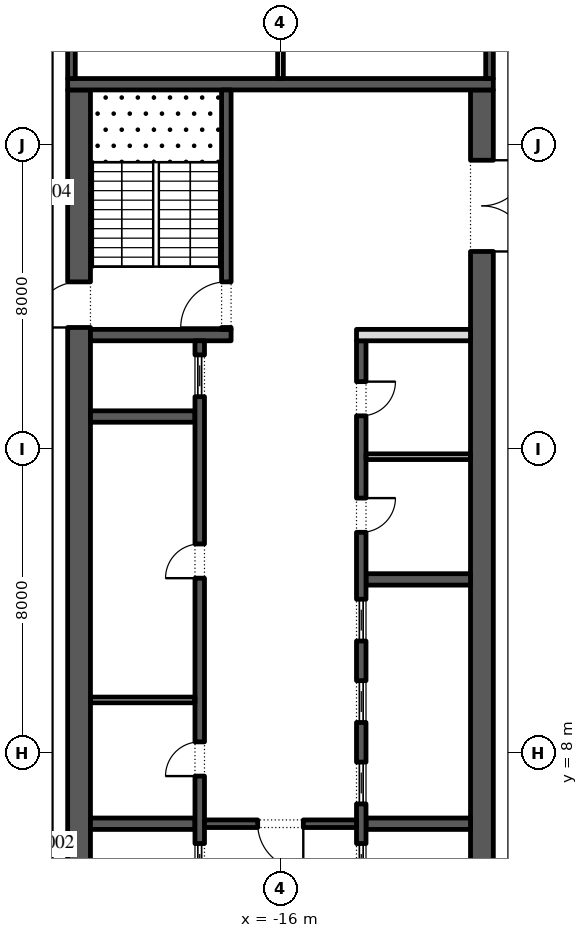
"""IFC4 building model, lengths in metres.
Left out: names, types, materials, properties, quantities, classifications, styles, units other than length and angle.
Written with IfcOpenShell. Run it as: python <this file> out.ifc"""

import sys

from ifc_helpers import new_model, si_unit, direction, frame, frame_2d, origin, place, context, subcontext, project, spatial, rectangle, extrude, element, fill, save


model = new_model("IFC4")
c1 = context("Model", 3, precision=1e-05, world=origin(), true_north=direction((0.0, 1.0)))
c2 = subcontext(c1, "Body", "Model", "MODEL_VIEW")
j1 = project(units=[si_unit("LENGTHUNIT", "METRE"), si_unit("PLANEANGLEUNIT", "RADIAN")], contexts=[c1])
p1 = place(None, origin())
s1 = spatial("IfcSite", under=j1, at=p1, CompositionType="ELEMENT")
p2 = place(p1, origin())
s2 = spatial("IfcBuilding", under=s1, at=p2, CompositionType="ELEMENT")
p3 = place(p2, frame((0.0, 0.0, 243.0)))
s3 = spatial("IfcBuildingStorey", under=s2, at=p3, CompositionType="ELEMENT", Elevation=243.0)
p4 = place(p3, frame((-21.359, 48.678, 0.0), z_axis=(0.0, 0.0, 1.0), x_axis=(-0.224949198343, -0.974370493275, 0.0)))
e1 = element("IfcWall", 1, at=p4, inside=s3, PredefinedType="STANDARD", context=c2, shape_type="SweptSolid", body=[
    extrude(rectangle(XDim=49.5, YDim=0.3, at=frame_2d((24.75, 0.0))), origin(), (0.0, 0.0, 1.0), 4.0),
])
p5 = place(p4, frame((1.157, 0.0, 0.45)))
e2 = element("IfcOpeningElement", 2, at=p5, cuts=e1, PredefinedType="OPENING", context=c2, shape_type="SweptSolid", body=[
    extrude(rectangle(XDim=4.5, YDim=3.05, at=frame_2d((2.25, 1.525))), frame((0.0, 0.16, 0.0), z_axis=(0.0, -1.0, 0.0), x_axis=(1.0, 0.0, 0.0)), (0.0, 0.0, 1.0), 0.32),
])
p6 = place(p4, frame((9.171, 0.0, 0.0)))
e3 = element("IfcOpeningElement", 3, at=p6, cuts=e1, PredefinedType="OPENING", context=c2, shape_type="SweptSolid", body=[
    extrude(rectangle(XDim=2.4, YDim=3.5, at=frame_2d((1.2, 1.75))), frame((0.0, 0.16, 0.0), z_axis=(0.0, -1.0, 0.0), x_axis=(1.0, 0.0, 0.0)), (0.0, 0.0, 1.0), 0.32),
])
p7 = place(p4, frame((15.236, 0.0, 0.45)))
e4 = element("IfcOpeningElement", 4, at=p7, cuts=e1, PredefinedType="OPENING", context=c2, shape_type="SweptSolid", body=[
    extrude(rectangle(XDim=4.5, YDim=3.05, at=frame_2d((2.25, 1.525))), frame((0.0, 0.16, 0.0), z_axis=(0.0, -1.0, 0.0), x_axis=(1.0, 0.0, 0.0)), (0.0, 0.0, 1.0), 0.32),
])
p8 = place(p4, frame((22.35, 0.0, 0.45)))
e5 = element("IfcOpeningElement", 5, at=p8, cuts=e1, PredefinedType="OPENING", context=c2, shape_type="SweptSolid", body=[
    extrude(rectangle(XDim=4.5, YDim=3.05, at=frame_2d((2.25, 1.525))), frame((0.0, 0.16, 0.0), z_axis=(0.0, -1.0, 0.0), x_axis=(1.0, 0.0, 0.0)), (0.0, 0.0, 1.0), 0.32),
])
p9 = place(p4, frame((29.464, 0.0, 0.45)))
e6 = element("IfcOpeningElement", 6, at=p9, cuts=e1, PredefinedType="OPENING", context=c2, shape_type="SweptSolid", body=[
    extrude(rectangle(XDim=4.5, YDim=3.05, at=frame_2d((2.25, 1.525))), frame((0.0, 0.16, 0.0), z_axis=(0.0, -1.0, 0.0), x_axis=(1.0, 0.0, 0.0)), (0.0, 0.0, 1.0), 0.32),
])
p10 = place(p4, frame((37.628, 0.0, 0.0)))
e7 = element("IfcOpeningElement", 7, at=p10, cuts=e1, PredefinedType="OPENING", context=c2, shape_type="SweptSolid", body=[
    extrude(rectangle(XDim=2.4, YDim=3.325, at=frame_2d((1.2, 1.663))), frame((0.0, 0.16, 0.0), z_axis=(0.0, -1.0, 0.0), x_axis=(1.0, 0.0, 0.0)), (0.0, 0.0, 1.0), 0.32),
])
p11 = place(p4, frame((43.693, 0.0, 0.45)))
e8 = element("IfcOpeningElement", 8, at=p11, cuts=e1, PredefinedType="OPENING", context=c2, shape_type="SweptSolid", body=[
    extrude(rectangle(XDim=4.5, YDim=2.825, at=frame_2d((2.25, 1.413))), frame((0.0, 0.16, 0.0), z_axis=(0.0, -1.0, 0.0), x_axis=(1.0, 0.0, 0.0)), (0.0, 0.0, 1.0), 0.32),
])
p12 = place(p3, frame((-21.3, -2.45, 0.0), z_axis=(0.0, 0.0, 1.0), x_axis=(0.0, 1.0, 0.0)))
e9 = element("IfcWall", 9, at=p12, inside=s3, PredefinedType="SHEAR", context=c2, shape_type="SweptSolid", body=[
    extrude(rectangle(XDim=27.9, YDim=0.6, at=frame_2d((13.95, 0.0))), origin(), (0.0, 0.0, 1.0), 4.0),
])
p13 = place(p12, frame((5.05, 0.0, 0.0)))
e10 = element("IfcOpeningElement", 10, at=p13, cuts=e9, PredefinedType="OPENING", context=c2, shape_type="SweptSolid", body=[
    extrude(rectangle(XDim=1.2, YDim=2.1, at=frame_2d((0.6, 1.05))), frame((0.0, 0.31, 0.0), z_axis=(0.0, -1.0, 0.0), x_axis=(1.0, 0.0, 0.0)), (0.0, 0.0, 1.0), 0.62),
])
p14 = place(p12, frame((21.65, 0.0, 0.0)))
e11 = element("IfcOpeningElement", 11, at=p14, cuts=e9, PredefinedType="OPENING", context=c2, shape_type="SweptSolid", body=[
    extrude(rectangle(XDim=1.2, YDim=2.1, at=frame_2d((0.6, 1.05))), frame((0.0, 0.31, 0.0), z_axis=(0.0, -1.0, 0.0), x_axis=(1.0, 0.0, 0.0)), (0.0, 0.0, 1.0), 0.62),
])
p15 = place(p3, frame((-10.7, -2.45, 0.0), z_axis=(0.0, 0.0, 1.0), x_axis=(0.0, 1.0, 0.0)))
e12 = element("IfcWall", 12, at=p15, inside=s3, PredefinedType="SHEAR", context=c2, shape_type="SweptSolid", body=[
    extrude(rectangle(XDim=27.9, YDim=0.6, at=frame_2d((13.95, 0.0))), origin(), (0.0, 0.0, 1.0), 4.0),
])
p16 = place(p15, frame((23.65, 0.0, 0.0)))
e13 = element("IfcOpeningElement", 13, at=p16, cuts=e12, PredefinedType="OPENING", context=c2, shape_type="SweptSolid", body=[
    extrude(rectangle(XDim=2.4, YDim=2.1, at=frame_2d((1.2, 1.05))), frame((0.0, 0.31, 0.0), z_axis=(0.0, -1.0, 0.0), x_axis=(1.0, 0.0, 0.0)), (0.0, 0.0, 1.0), 0.62),
])
p17 = place(p15, frame((1.087, 0.0, 0.0)))
e14 = element("IfcOpeningElement", 14, at=p17, cuts=e12, PredefinedType="OPENING", context=c2, shape_type="SweptSolid", body=[
    extrude(rectangle(XDim=0.9, YDim=2.1, at=frame_2d((0.45, 1.05))), frame((0.0, 0.31, 0.0), z_axis=(0.0, -1.0, 0.0), x_axis=(1.0, 0.0, 0.0)), (0.0, 0.0, 1.0), 0.62),
])
p18 = place(p15, frame((4.262, 0.0, 0.0)))
e15 = element("IfcOpeningElement", 15, at=p18, cuts=e12, PredefinedType="OPENING", context=c2, shape_type="SweptSolid", body=[
    extrude(rectangle(XDim=1.0, YDim=2.1, at=frame_2d((0.5, 1.05))), frame((0.0, 0.31, 0.0), z_axis=(0.0, -1.0, 0.0), x_axis=(1.0, 0.0, 0.0)), (0.0, 0.0, 1.0), 0.62),
])
p19 = place(p3, frame((-21.6, 25.6, 0.0), z_axis=(0.0, 0.0, 1.0), x_axis=(1.0, 0.0, 0.0)))
e16 = element("IfcWall", 16, at=p19, inside=s3, PredefinedType="SHEAR", context=c2, shape_type="SweptSolid", body=[
    extrude(rectangle(XDim=11.2, YDim=0.3, at=frame_2d((5.6, 0.0))), origin(), (0.0, 0.0, 1.0), 4.0),
])
p20 = place(p3, frame((-21.0, 19.0, 0.0), z_axis=(0.0, 0.0, 1.0), x_axis=(1.0, 0.0, 0.0)))
e17 = element("IfcWall", 17, at=p20, inside=s3, PredefinedType="SHEAR", context=c2, shape_type="SweptSolid", body=[
    extrude(rectangle(XDim=3.7, YDim=0.3, at=frame_2d((1.85, 0.0))), origin(), (0.0, 0.0, 1.0), 4.0),
])
p21 = place(p3, frame((-17.425, 19.15, 0.0), z_axis=(0.0, 0.0, 1.0), x_axis=(0.0, 1.0, 0.0)))
e18 = element("IfcWall", 18, at=p21, inside=s3, PredefinedType="SHEAR", context=c2, shape_type="SweptSolid", body=[
    extrude(rectangle(XDim=6.3, YDim=0.25, at=frame_2d((3.15, 0.0))), origin(), (0.0, 0.0, 1.0), 4.0),
])
p22 = place(p21, frame((0.05, 0.0, 0.0)))
e19 = element("IfcOpeningElement", 19, at=p22, cuts=e18, PredefinedType="OPENING", context=c2, shape_type="SweptSolid", body=[
    extrude(rectangle(XDim=1.2, YDim=2.1, at=frame_2d((0.6, 1.05))), frame((0.0, 0.135, 0.0), z_axis=(0.0, -1.0, 0.0), x_axis=(1.0, 0.0, 0.0)), (0.0, 0.0, 1.0), 0.27),
])
for number, where, z_axis, x_axis in (
    (20, (-21.0, 6.143, 0.0), (0.0, 0.0, 1.0), (1.0, 0.0, 0.0)),
    (21, (-21.0, 16.857, 0.0), (0.0, 0.0, 1.0), (1.0, 0.0, 0.0)),
):
    element("IfcWall", number, at=place(p3, frame(where, z_axis=z_axis, x_axis=x_axis)), inside=s3, PredefinedType="SHEAR", context=c2, shape_type="SweptSolid", body=[
        extrude(rectangle(XDim=2.75, YDim=0.3, at=frame_2d((1.375, 0.0))), origin(), (0.0, 0.0, 1.0), 4.0),
    ])
p23 = place(p3, frame((-18.125, 4.15, 0.0), z_axis=(0.0, 0.0, 1.0), x_axis=(0.0, 1.0, 0.0)))
e22 = element("IfcWall", 22, at=p23, inside=s3, PredefinedType="SHEAR", context=c2, shape_type="SweptSolid", body=[
    extrude(rectangle(XDim=14.7, YDim=0.25, at=frame_2d((7.35, 0.0))), origin(), (0.0, 0.0, 1.0), 4.0),
])
p24 = place(p23, frame((3.246, 0.0, 0.0)))
e23 = element("IfcOpeningElement", 23, at=p24, cuts=e22, PredefinedType="OPENING", context=c2, shape_type="SweptSolid", body=[
    extrude(rectangle(XDim=0.9, YDim=2.1, at=frame_2d((0.45, 1.05))), frame((0.0, 0.135, 0.0), z_axis=(0.0, -1.0, 0.0), x_axis=(1.0, 0.0, 0.0)), (0.0, 0.0, 1.0), 0.27),
])
p25 = place(p23, frame((8.454, 0.0, 0.0)))
e24 = element("IfcOpeningElement", 24, at=p25, cuts=e22, PredefinedType="OPENING", context=c2, shape_type="SweptSolid", body=[
    extrude(rectangle(XDim=0.9, YDim=2.1, at=frame_2d((0.45, 1.05))), frame((0.0, 0.135, 0.0), z_axis=(0.0, -1.0, 0.0), x_axis=(1.0, 0.0, 0.0)), (0.0, 0.0, 1.0), 0.27),
])
p26 = place(p23, frame((0.371, 0.0, 0.0)))
e25 = element("IfcOpeningElement", 25, at=p26, cuts=e22, PredefinedType="OPENING", context=c2, shape_type="SweptSolid", body=[
    extrude(rectangle(XDim=1.1, YDim=2.1, at=frame_2d((0.55, 1.05))), frame((0.0, 0.135, 0.0), z_axis=(0.0, -1.0, 0.0), x_axis=(1.0, 0.0, 0.0)), (0.0, 0.0, 1.0), 0.27),
])
p27 = place(p23, frame((13.229, 0.0, 0.0)))
e26 = element("IfcOpeningElement", 26, at=p27, cuts=e22, PredefinedType="OPENING", context=c2, shape_type="SweptSolid", body=[
    extrude(rectangle(XDim=1.1, YDim=2.1, at=frame_2d((0.55, 1.05))), frame((0.0, 0.135, 0.0), z_axis=(0.0, -1.0, 0.0), x_axis=(1.0, 0.0, 0.0)), (0.0, 0.0, 1.0), 0.27),
])
p28 = place(p3, frame((-21.0, 9.4, 0.0), z_axis=(0.0, 0.0, 1.0), x_axis=(1.0, 0.0, 0.0)))
e27 = element("IfcWall", 27, at=p28, inside=s3, PredefinedType="PARTITIONING", context=c2, shape_type="SweptSolid", body=[
    extrude(rectangle(XDim=2.75, YDim=0.15, at=frame_2d((1.375, 0.0))), origin(), (0.0, 0.0, 1.0), 4.0),
])
for number, where, z_axis, x_axis in (
    (28, (-13.75, 6.143, 0.0), (0.0, 0.0, 1.0), (1.0, 0.0, 0.0)),
    (29, (-13.75, 12.571, 0.0), (0.0, 0.0, 1.0), (1.0, 0.0, 0.0)),
):
    element("IfcWall", number, at=place(p3, frame(where, z_axis=z_axis, x_axis=x_axis)), inside=s3, PredefinedType="SHEAR", context=c2, shape_type="SweptSolid", body=[
        extrude(rectangle(XDim=2.75, YDim=0.3, at=frame_2d((1.375, 0.0))), origin(), (0.0, 0.0, 1.0), 4.0),
    ])
p29 = place(p3, frame((-13.875, -2.45, 0.0), z_axis=(0.0, 0.0, 1.0), x_axis=(0.0, 1.0, 0.0)))
e30 = element("IfcWall", 30, at=p29, inside=s3, PredefinedType="SHEAR", context=c2, shape_type="SweptSolid", body=[
    extrude(rectangle(XDim=21.3, YDim=0.25, at=frame_2d((10.65, 0.0))), origin(), (0.0, 0.0, 1.0), 4.0),
])
p30 = place(p29, frame((16.261, 0.0, 0.0)))
e31 = element("IfcOpeningElement", 31, at=p30, cuts=e30, PredefinedType="OPENING", context=c2, shape_type="SweptSolid", body=[
    extrude(rectangle(XDim=0.9, YDim=2.1, at=frame_2d((0.45, 1.05))), frame((0.0, 0.135, 0.0), z_axis=(0.0, -1.0, 0.0), x_axis=(1.0, 0.0, 0.0)), (0.0, 0.0, 1.0), 0.27),
])
p31 = place(p29, frame((19.325, 0.0, 0.0)))
e32 = element("IfcOpeningElement", 32, at=p31, cuts=e30, PredefinedType="OPENING", context=c2, shape_type="SweptSolid", body=[
    extrude(rectangle(XDim=0.9, YDim=2.1, at=frame_2d((0.45, 1.05))), frame((0.0, 0.135, 0.0), z_axis=(0.0, -1.0, 0.0), x_axis=(1.0, 0.0, 0.0)), (0.0, 0.0, 1.0), 0.27),
])
p32 = place(p29, frame((6.971, 0.0, 0.0)))
e33 = element("IfcOpeningElement", 33, at=p32, cuts=e30, PredefinedType="OPENING", context=c2, shape_type="SweptSolid", body=[
    extrude(rectangle(XDim=1.1, YDim=2.1, at=frame_2d((0.55, 1.05))), frame((0.0, 0.135, 0.0), z_axis=(0.0, -1.0, 0.0), x_axis=(1.0, 0.0, 0.0)), (0.0, 0.0, 1.0), 0.27),
])
p33 = place(p29, frame((9.114, 0.0, 0.0)))
e34 = element("IfcOpeningElement", 34, at=p33, cuts=e30, PredefinedType="OPENING", context=c2, shape_type="SweptSolid", body=[
    extrude(rectangle(XDim=1.1, YDim=2.1, at=frame_2d((0.55, 1.05))), frame((0.0, 0.135, 0.0), z_axis=(0.0, -1.0, 0.0), x_axis=(1.0, 0.0, 0.0)), (0.0, 0.0, 1.0), 0.27),
])
p34 = place(p29, frame((11.257, 0.0, 0.0)))
e35 = element("IfcOpeningElement", 35, at=p34, cuts=e30, PredefinedType="OPENING", context=c2, shape_type="SweptSolid", body=[
    extrude(rectangle(XDim=1.1, YDim=2.1, at=frame_2d((0.55, 1.05))), frame((0.0, 0.135, 0.0), z_axis=(0.0, -1.0, 0.0), x_axis=(1.0, 0.0, 0.0)), (0.0, 0.0, 1.0), 0.27),
])
p35 = place(p29, frame((13.4, 0.0, 0.0)))
e36 = element("IfcOpeningElement", 36, at=p35, cuts=e30, PredefinedType="OPENING", context=c2, shape_type="SweptSolid", body=[
    extrude(rectangle(XDim=1.1, YDim=2.1, at=frame_2d((0.55, 1.05))), frame((0.0, 0.135, 0.0), z_axis=(0.0, -1.0, 0.0), x_axis=(1.0, 0.0, 0.0)), (0.0, 0.0, 1.0), 0.27),
])
p36 = place(p3, frame((-14.0, 19.0, 0.0), z_axis=(0.0, 0.0, 1.0), x_axis=(1.0, 0.0, 0.0)))
e37 = element("IfcWall", 37, at=p36, inside=s3, PredefinedType="PARTITIONING", context=c2, shape_type="SweptSolid", body=[
    extrude(rectangle(XDim=3.0, YDim=0.3, at=frame_2d((1.5, 0.0))), origin(), (0.0, 0.0, 1.0), 4.0),
])
p37 = place(p3, frame((-13.75, 15.8, 0.0), z_axis=(0.0, 0.0, 1.0), x_axis=(1.0, 0.0, 0.0)))
e38 = element("IfcWall", 38, at=p37, inside=s3, PredefinedType="PARTITIONING", context=c2, shape_type="SweptSolid", body=[
    extrude(rectangle(XDim=2.75, YDim=0.15, at=frame_2d((1.375, 0.0))), origin(), (0.0, 0.0, 1.0), 4.0),
])
p38 = place(p3, frame((-18.0, 6.143, 0.0), z_axis=(0.0, 0.0, 1.0), x_axis=(1.0, 0.0, 0.0)))
e39 = element("IfcWall", 39, at=p38, inside=s3, PredefinedType="SHEAR", context=c2, shape_type="SweptSolid", body=[
    extrude(rectangle(XDim=4.0, YDim=0.2, at=frame_2d((2.0, 0.0))), origin(), (0.0, 0.0, 1.0), 4.0),
])
p39 = place(p38, frame((1.4, 0.0, 0.0)))
e40 = element("IfcOpeningElement", 40, at=p39, cuts=e39, PredefinedType="OPENING", context=c2, shape_type="SweptSolid", body=[
    extrude(rectangle(XDim=1.2, YDim=2.1, at=frame_2d((0.6, 1.05))), frame((0.0, 0.11, 0.0), z_axis=(0.0, -1.0, 0.0), x_axis=(1.0, 0.0, 0.0)), (0.0, 0.0, 1.0), 0.22),
])
p40 = place(p3, frame((-21.5, 25.75, 0.0), z_axis=(0.0, 0.0, 1.0), x_axis=(0.0, 1.0, 0.0)))
e41 = element("IfcWall", 41, at=p40, inside=s3, PredefinedType="SHEAR", context=c2, shape_type="SweptSolid", body=[
    extrude(rectangle(XDim=4.75, YDim=0.2, at=frame_2d((2.375, 0.0))), origin(), (0.0, 0.0, 1.0), 4.0),
])
p41 = place(p40, frame((1.925, 0.0, 0.0)))
e42 = element("IfcOpeningElement", 42, at=p41, cuts=e41, PredefinedType="OPENING", context=c2, shape_type="SweptSolid", body=[
    extrude(rectangle(XDim=0.9, YDim=2.1, at=frame_2d((0.45, 1.05))), frame((0.0, 0.11, 0.0), z_axis=(0.0, -1.0, 0.0), x_axis=(1.0, 0.0, 0.0)), (0.0, 0.0, 1.0), 0.22),
])
p42 = place(p3, frame((-10.5, 25.75, 0.0), z_axis=(0.0, 0.0, 1.0), x_axis=(0.0, 1.0, 0.0)))
e43 = element("IfcWall", 43, at=p42, inside=s3, PredefinedType="SHEAR", context=c2, shape_type="SweptSolid", body=[
    extrude(rectangle(XDim=4.75, YDim=0.2, at=frame_2d((2.375, 0.0))), origin(), (0.0, 0.0, 1.0), 4.0),
])
p43 = place(p42, frame((1.925, 0.0, 0.0)))
e44 = element("IfcOpeningElement", 44, at=p43, cuts=e43, PredefinedType="OPENING", context=c2, shape_type="SweptSolid", body=[
    extrude(rectangle(XDim=0.9, YDim=2.1, at=frame_2d((0.45, 1.05))), frame((0.0, 0.11, 0.0), z_axis=(0.0, -1.0, 0.0), x_axis=(1.0, 0.0, 0.0)), (0.0, 0.0, 1.0), 0.22),
])
p44 = place(p3, frame((-16.0, 25.75, 0.0), z_axis=(0.0, 0.0, 1.0), x_axis=(0.0, 1.0, 0.0)))
e45 = element("IfcWall", 45, at=p44, inside=s3, PredefinedType="PARTITIONING", context=c2, shape_type="SweptSolid", body=[
    extrude(rectangle(XDim=4.75, YDim=0.15, at=frame_2d((2.375, 0.0))), origin(), (0.0, 0.0, 1.0), 4.0),
])
p45 = place(p24, origin())
e46 = element("IfcDoor", 46, at=p45, inside=s3, OperationType="SINGLE_SWING_RIGHT", PredefinedType="DOOR", context=c2, shape_type="SweptSolid", body=[
    extrude(rectangle(XDim=0.9, YDim=2.1, at=frame_2d((0.45, 1.05))), frame((0.0, 0.125, 0.0), z_axis=(0.0, -1.0, 0.0), x_axis=(1.0, 0.0, 0.0)), (0.0, 0.0, 1.0), 0.05),
])
fill(e23, e46)
p46 = place(p25, origin())
e47 = element("IfcDoor", 47, at=p46, inside=s3, OperationType="SINGLE_SWING_RIGHT", PredefinedType="DOOR", context=c2, shape_type="SweptSolid", body=[
    extrude(rectangle(XDim=0.9, YDim=2.1, at=frame_2d((0.45, 1.05))), frame((0.0, 0.125, 0.0), z_axis=(0.0, -1.0, 0.0), x_axis=(1.0, 0.0, 0.0)), (0.0, 0.0, 1.0), 0.05),
])
fill(e24, e47)
p47 = place(p26, origin())
e48 = element("IfcDoor", 48, at=p47, inside=s3, OperationType="SLIDING_TO_LEFT", PredefinedType="DOOR", context=c2, shape_type="SweptSolid", body=[
    extrude(rectangle(XDim=1.1, YDim=2.1, at=frame_2d((0.55, 1.05))), frame((0.0, 0.025, 0.0), z_axis=(0.0, -1.0, 0.0), x_axis=(1.0, 0.0, 0.0)), (0.0, 0.0, 1.0), 0.05),
])
fill(e25, e48)
p48 = place(p27, origin())
e49 = element("IfcDoor", 49, at=p48, inside=s3, OperationType="SLIDING_TO_LEFT", PredefinedType="DOOR", context=c2, shape_type="SweptSolid", body=[
    extrude(rectangle(XDim=1.1, YDim=2.1, at=frame_2d((0.55, 1.05))), frame((0.0, 0.025, 0.0), z_axis=(0.0, -1.0, 0.0), x_axis=(1.0, 0.0, 0.0)), (0.0, 0.0, 1.0), 0.05),
])
fill(e26, e49)
p49 = place(p30, frame((0.9, -0.2, 0.0), z_axis=(0.0, 0.0, 1.0), x_axis=(-1.0, 0.0, 0.0)))
e50 = element("IfcDoor", 50, at=p49, inside=s3, OperationType="SINGLE_SWING_RIGHT", PredefinedType="DOOR", context=c2, shape_type="SweptSolid", body=[
    extrude(rectangle(XDim=0.9, YDim=2.1, at=frame_2d((0.45, 1.05))), frame((0.0, -0.075, 0.0), z_axis=(0.0, -1.0, 0.0), x_axis=(1.0, 0.0, 0.0)), (0.0, 0.0, 1.0), 0.05),
])
fill(e31, e50)
p50 = place(p31, frame((0.9, -0.2, 0.0), z_axis=(0.0, 0.0, 1.0), x_axis=(-1.0, 0.0, 0.0)))
e51 = element("IfcDoor", 51, at=p50, inside=s3, OperationType="SINGLE_SWING_RIGHT", PredefinedType="DOOR", context=c2, shape_type="SweptSolid", body=[
    extrude(rectangle(XDim=0.9, YDim=2.1, at=frame_2d((0.45, 1.05))), frame((0.0, -0.075, 0.0), z_axis=(0.0, -1.0, 0.0), x_axis=(1.0, 0.0, 0.0)), (0.0, 0.0, 1.0), 0.05),
])
fill(e32, e51)
p51 = place(p32, origin())
e52 = element("IfcDoor", 52, at=p51, inside=s3, OperationType="SLIDING_TO_LEFT", PredefinedType="DOOR", context=c2, shape_type="SweptSolid", body=[
    extrude(rectangle(XDim=1.1, YDim=2.1, at=frame_2d((0.55, 1.05))), frame((0.0, 0.025, 0.0), z_axis=(0.0, -1.0, 0.0), x_axis=(1.0, 0.0, 0.0)), (0.0, 0.0, 1.0), 0.05),
])
fill(e33, e52)
p52 = place(p33, origin())
e53 = element("IfcDoor", 53, at=p52, inside=s3, OperationType="SLIDING_TO_LEFT", PredefinedType="DOOR", context=c2, shape_type="SweptSolid", body=[
    extrude(rectangle(XDim=1.1, YDim=2.1, at=frame_2d((0.55, 1.05))), frame((0.0, 0.025, 0.0), z_axis=(0.0, -1.0, 0.0), x_axis=(1.0, 0.0, 0.0)), (0.0, 0.0, 1.0), 0.05),
])
fill(e34, e53)
p53 = place(p34, origin())
e54 = element("IfcDoor", 54, at=p53, inside=s3, OperationType="SLIDING_TO_LEFT", PredefinedType="DOOR", context=c2, shape_type="SweptSolid", body=[
    extrude(rectangle(XDim=1.1, YDim=2.1, at=frame_2d((0.55, 1.05))), frame((0.0, 0.025, 0.0), z_axis=(0.0, -1.0, 0.0), x_axis=(1.0, 0.0, 0.0)), (0.0, 0.0, 1.0), 0.05),
])
fill(e35, e54)
p54 = place(p35, origin())
e55 = element("IfcDoor", 55, at=p54, inside=s3, OperationType="SLIDING_TO_LEFT", PredefinedType="DOOR", context=c2, shape_type="SweptSolid", body=[
    extrude(rectangle(XDim=1.1, YDim=2.1, at=frame_2d((0.55, 1.05))), frame((0.0, 0.025, 0.0), z_axis=(0.0, -1.0, 0.0), x_axis=(1.0, 0.0, 0.0)), (0.0, 0.0, 1.0), 0.05),
])
fill(e36, e55)
p55 = place(p39, frame((1.2, 0.0, 0.0), z_axis=(0.0, 0.0, 1.0), x_axis=(-1.0, 0.0, 0.0)))
e56 = element("IfcDoor", 56, at=p55, inside=s3, OperationType="SINGLE_SWING_RIGHT", PredefinedType="DOOR", context=c2, shape_type="SweptSolid", body=[
    extrude(rectangle(XDim=1.2, YDim=2.1, at=frame_2d((0.6, 1.05))), frame((0.0, 0.025, 0.0), z_axis=(0.0, -1.0, 0.0), x_axis=(1.0, 0.0, 0.0)), (0.0, 0.0, 1.0), 0.05),
])
fill(e40, e56)
p56 = place(p16, frame((2.4, 0.0, 0.0), z_axis=(0.0, 0.0, 1.0), x_axis=(-1.0, 0.0, 0.0)))
e57 = element("IfcDoor", 57, at=p56, inside=s3, OperationType="DOUBLE_DOOR_SINGLE_SWING", PredefinedType="DOOR", context=c2, shape_type="SweptSolid", body=[
    extrude(rectangle(XDim=2.4, YDim=2.1, at=frame_2d((1.2, 1.05))), frame((0.0, 0.025, 0.0), z_axis=(0.0, -1.0, 0.0), x_axis=(1.0, 0.0, 0.0)), (0.0, 0.0, 1.0), 0.05),
])
fill(e13, e57)
p57 = place(p22, origin())
e58 = element("IfcDoor", 58, at=p57, inside=s3, OperationType="SINGLE_SWING_RIGHT", PredefinedType="DOOR", context=c2, shape_type="SweptSolid", body=[
    extrude(rectangle(XDim=1.2, YDim=2.1, at=frame_2d((0.6, 1.05))), frame((0.0, 0.025, 0.0), z_axis=(0.0, -1.0, 0.0), x_axis=(1.0, 0.0, 0.0)), (0.0, 0.0, 1.0), 0.05),
])
fill(e19, e58)
p58 = place(p14, origin())
e59 = element("IfcDoor", 59, at=p58, inside=s3, OperationType="SINGLE_SWING_RIGHT", PredefinedType="DOOR", context=c2, shape_type="SweptSolid", body=[
    extrude(rectangle(XDim=1.2, YDim=2.1, at=frame_2d((0.6, 1.05))), frame((0.0, 0.025, 0.0), z_axis=(0.0, -1.0, 0.0), x_axis=(1.0, 0.0, 0.0)), (0.0, 0.0, 1.0), 0.05),
])
fill(e11, e59)
save(model, sys.argv[1])
